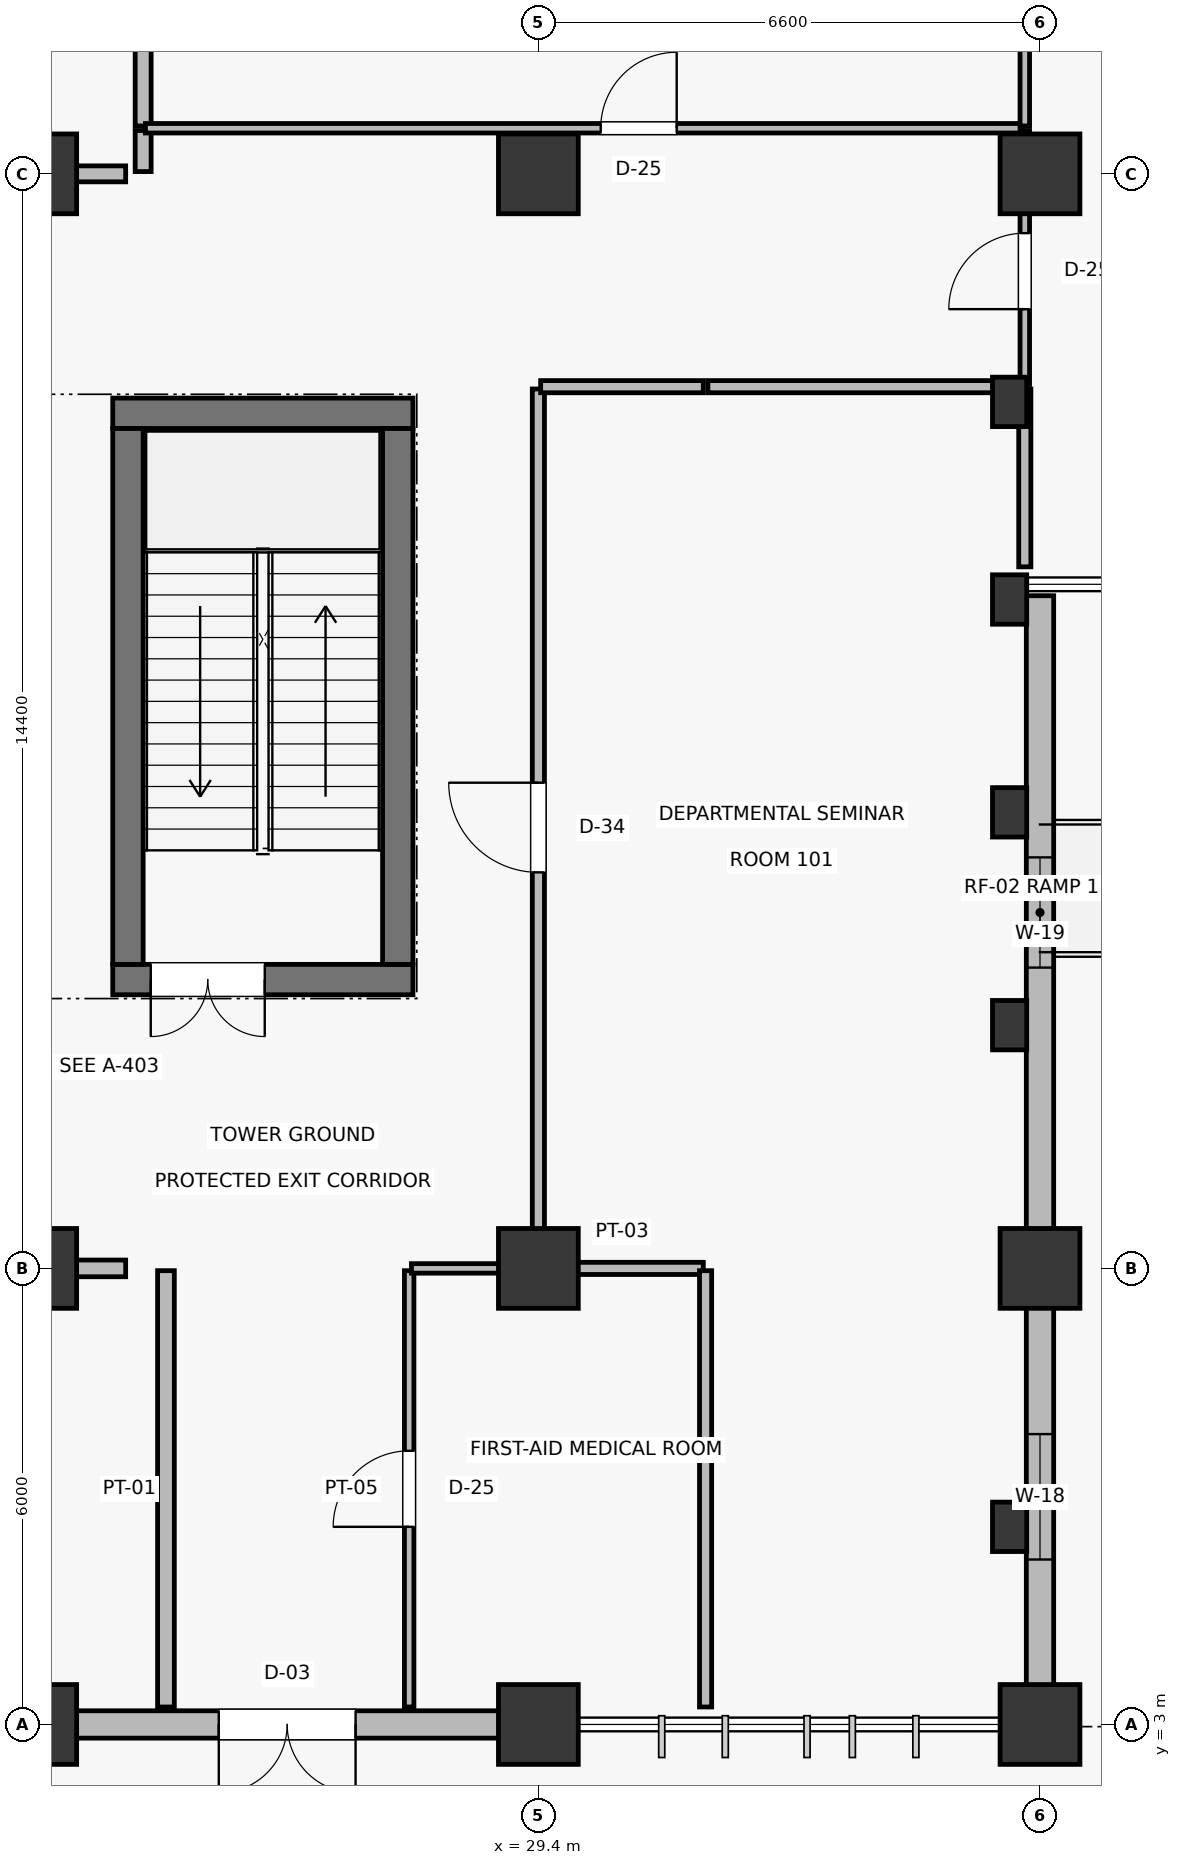
"""IFC4 building model, lengths in metres.
Left out: names, types, materials, properties, quantities, classifications, styles, units other than length and angle.
Written with IfcOpenShell. Run it as: python <this file> out.ifc"""

import sys

from ifc_helpers import new_model, si_unit, direction, frame, frame_2d, origin, origin_2d, place, context, subcontext, project, spatial, rectangle, extrude, element, fill, save


model = new_model("IFC4")
c1 = context("Model", 3, precision=1e-05, world=origin(), true_north=direction((0.0, 1.0)))
c2 = subcontext(c1, "Body", "Model", "MODEL_VIEW")
j1 = project(units=[si_unit("LENGTHUNIT", "METRE"), si_unit("PLANEANGLEUNIT", "RADIAN")], contexts=[c1])
p1 = place(None, origin())
s1 = spatial("IfcSite", under=j1, at=p1, CompositionType="ELEMENT")
p2 = place(p1, origin())
s2 = spatial("IfcBuilding", under=s1, at=p2, CompositionType="ELEMENT")
p3 = place(p2, origin())
s3 = spatial("IfcBuildingStorey", under=s2, at=p3, CompositionType="ELEMENT", Elevation=0.0)
for number, where, z_axis, x_axis in (
    (1, (22.8, 3.0, 0.0), (0.0, 0.0, 1.0), (1.0, 0.0, 0.0)),
    (2, (22.8, 9.0, 0.0), (0.0, 0.0, 1.0), (1.0, 0.0, 0.0)),
    (3, (22.8, 23.4, 0.0), (0.0, 0.0, 1.0), (1.0, 0.0, 0.0)),
    (4, (29.4, 3.0, 0.0), (0.0, 0.0, 1.0), (1.0, 0.0, 0.0)),
    (5, (29.4, 9.0, 0.0), (0.0, 0.0, 1.0), (1.0, 0.0, 0.0)),
    (6, (29.4, 23.4, 0.0), (0.0, 0.0, 1.0), (1.0, 0.0, 0.0)),
    (7, (36.0, 3.0, 0.0), (0.0, 0.0, 1.0), (1.0, 0.0, 0.0)),
    (8, (36.0, 9.0, 0.0), (0.0, 0.0, 1.0), (1.0, 0.0, 0.0)),
    (9, (36.0, 23.4, 0.0), (0.0, 0.0, 1.0), (1.0, 0.0, 0.0)),
):
    element("IfcColumn", number, at=place(p3, frame(where, z_axis=z_axis, x_axis=x_axis)), inside=s3, PredefinedType="COLUMN", context=c2, shape_type="SweptSolid", body=[
        extrude(rectangle(XDim=1.05, YDim=1.05, at=origin_2d()), origin(), (0.0, 0.0, 1.0), 5.4),
    ])
for number, where, z_axis, x_axis in (
    (10, (35.6, 5.6, 0.0), (0.0, 0.0, 1.0), (1.0, 0.0, 0.0)),
    (11, (35.6, 12.2, 0.0), (0.0, 0.0, 1.0), (1.0, 0.0, 0.0)),
    (12, (35.6, 15.0, 0.0), (0.0, 0.0, 1.0), (1.0, 0.0, 0.0)),
    (13, (35.6, 17.8, 0.0), (0.0, 0.0, 1.0), (1.0, 0.0, 0.0)),
    (14, (35.6, 20.4, 0.0), (0.0, 0.0, 1.0), (1.0, 0.0, 0.0)),
):
    element("IfcColumn", number, at=place(p3, frame(where, z_axis=z_axis, x_axis=x_axis)), inside=s3, PredefinedType="PILASTER", context=c2, shape_type="SweptSolid", body=[
        extrude(rectangle(XDim=0.45, YDim=0.65, at=origin_2d()), origin(), (0.0, 0.0, 1.0), 5.4),
    ])
p4 = place(p3, frame((23.305, 3.0, 0.0), z_axis=(0.0, 0.0, 1.0), x_axis=(1.0, 0.0, 0.0)))
e15 = element("IfcWall", 15, at=p4, inside=s3, PredefinedType="SOLIDWALL", context=c2, shape_type="SweptSolid", body=[
    extrude(rectangle(XDim=5.58, YDim=0.36, at=frame_2d((2.79, 0.0))), origin(), (0.0, 0.0, 1.0), 4.475),
])
p5 = place(p4, frame((1.89, 0.0, 0.0)))
e16 = element("IfcOpeningElement", 16, at=p5, cuts=e15, PredefinedType="OPENING", context=c2, shape_type="SweptSolid", body=[
    extrude(rectangle(XDim=1.8, YDim=2.3, at=frame_2d((0.9, 1.15))), frame((0.0, 0.19, 0.0), z_axis=(0.0, -1.0, 0.0), x_axis=(1.0, 0.0, 0.0)), (0.0, 0.0, 1.0), 0.38),
])
p6 = place(p3, frame((36.0, 3.505, 0.0), z_axis=(0.0, 0.0, 1.0), x_axis=(0.0, 1.0, 0.0)))
e17 = element("IfcWall", 17, at=p6, inside=s3, PredefinedType="SOLIDWALL", context=c2, shape_type="SweptSolid", body=[
    extrude(rectangle(XDim=4.98, YDim=0.36, at=frame_2d((2.49, 0.0))), origin(), (0.0, 0.0, 1.0), 4.525),
])
p7 = place(p6, frame((1.665, 0.0, 0.9)))
e18 = element("IfcOpeningElement", 18, at=p7, cuts=e17, PredefinedType="OPENING", context=c2, shape_type="SweptSolid", body=[
    extrude(rectangle(XDim=1.65, YDim=1.65, at=frame_2d((0.825, 0.825))), frame((0.0, 0.19, 0.0), z_axis=(0.0, -1.0, 0.0), x_axis=(1.0, 0.0, 0.0)), (0.0, 0.0, 1.0), 0.38),
])
p8 = place(p3, frame((36.0, 9.515, 0.0), z_axis=(0.0, 0.0, 1.0), x_axis=(0.0, 1.0, 0.0)))
e19 = element("IfcWall", 19, at=p8, inside=s3, PredefinedType="SOLIDWALL", context=c2, shape_type="SweptSolid", body=[
    extrude(rectangle(XDim=8.335, YDim=0.36, at=frame_2d((4.167, 0.0))), origin(), (0.0, 0.0, 1.0), 4.325),
])
p9 = place(p8, frame((3.442, 0.0, 0.9)))
e20 = element("IfcOpeningElement", 20, at=p9, cuts=e19, PredefinedType="OPENING", context=c2, shape_type="SweptSolid", body=[
    extrude(rectangle(XDim=1.45, YDim=1.5, at=frame_2d((0.725, 0.75))), frame((0.0, 0.19, 0.0), z_axis=(0.0, -1.0, 0.0), x_axis=(1.0, 0.0, 0.0)), (0.0, 0.0, 1.0), 0.38),
])
p10 = place(p3, frame((23.8, 12.8, 0.0), z_axis=(0.0, 0.0, 1.0), x_axis=(1.0, 0.0, 0.0)))
e21 = element("IfcWall", 21, at=p10, inside=s3, PredefinedType="SHEAR", context=c2, shape_type="SweptSolid", body=[
    extrude(rectangle(XDim=3.95, YDim=0.4, at=frame_2d((1.975, 0.0))), origin(), (0.0, 0.0, 1.0), 5.18),
])
p11 = place(p10, frame((0.5, 0.0, 0.0)))
e22 = element("IfcOpeningElement", 22, at=p11, cuts=e21, PredefinedType="OPENING", context=c2, shape_type="SweptSolid", body=[
    extrude(rectangle(XDim=1.5, YDim=2.2, at=frame_2d((0.75, 1.1))), frame((0.0, 0.21, 0.0), z_axis=(0.0, -1.0, 0.0), x_axis=(1.0, 0.0, 0.0)), (0.0, 0.0, 1.0), 0.42),
])
p12 = place(p3, frame((23.8, 20.25, 0.0), z_axis=(0.0, 0.0, 1.0), x_axis=(1.0, 0.0, 0.0)))
e23 = element("IfcWall", 23, at=p12, inside=s3, PredefinedType="SHEAR", context=c2, shape_type="SweptSolid", body=[
    extrude(rectangle(XDim=3.95, YDim=0.4, at=frame_2d((1.975, 0.0))), origin(), (0.0, 0.0, 1.0), 5.18),
])
for number, where, z_axis, x_axis in (
    (24, (24.0, 13.0, 0.0), (0.0, 0.0, 1.0), (0.0, 1.0, 0.0)),
    (25, (27.55, 13.0, 0.0), (0.0, 0.0, 1.0), (0.0, 1.0, 0.0)),
):
    element("IfcWall", number, at=place(p3, frame(where, z_axis=z_axis, x_axis=x_axis)), inside=s3, PredefinedType="SHEAR", context=c2, shape_type="SweptSolid", body=[
        extrude(rectangle(XDim=7.05, YDim=0.4, at=frame_2d((3.525, 0.0))), origin(), (0.0, 0.0, 1.0), 5.18),
    ])
p13 = place(p3, frame((24.5, 3.23, 0.0), z_axis=(0.0, 0.0, 1.0), x_axis=(0.0, 1.0, 0.0)))
e26 = element("IfcWall", 26, at=p13, inside=s3, PredefinedType="PARTITIONING", context=c2, shape_type="SweptSolid", body=[
    extrude(rectangle(XDim=5.74, YDim=0.22, at=frame_2d((2.87, 0.0))), origin(), (0.0, 0.0, 1.0), 4.425),
])
p14 = place(p3, frame((14.53, 9.0, 0.0), z_axis=(0.0, 0.0, 1.0), x_axis=(1.0, 0.0, 0.0)))
e27 = element("IfcWall", 27, at=p14, inside=s3, PredefinedType="PARTITIONING", context=c2, shape_type="SweptSolid", body=[
    extrude(rectangle(XDim=9.44, YDim=0.22, at=frame_2d((4.72, 0.0))), origin(), (0.0, 0.0, 1.0), 4.255),
])
p15 = place(p14, frame((4.245, 0.0, 0.0)))
e28 = element("IfcOpeningElement", 28, at=p15, cuts=e27, PredefinedType="OPENING", context=c2, shape_type="SweptSolid", body=[
    extrude(rectangle(XDim=0.95, YDim=2.15, at=frame_2d((0.475, 1.075))), frame((0.0, 0.12, 0.0), z_axis=(0.0, -1.0, 0.0), x_axis=(1.0, 0.0, 0.0)), (0.0, 0.0, 1.0), 0.24),
])
p16 = place(p3, frame((29.43, 9.0, 0.0), z_axis=(0.0, 0.0, 1.0), x_axis=(1.0, 0.0, 0.0)))
e29 = element("IfcWall", 29, at=p16, inside=s3, PredefinedType="PARTITIONING", context=c2, shape_type="SweptSolid", body=[
    extrude(rectangle(XDim=2.14, YDim=0.16, at=frame_2d((1.07, 0.0))), origin(), (0.0, 0.0, 1.0), 4.215),
])
p17 = place(p3, frame((31.6, 3.23, 0.0), z_axis=(0.0, 0.0, 1.0), x_axis=(0.0, 1.0, 0.0)))
e30 = element("IfcWall", 30, at=p17, inside=s3, PredefinedType="PARTITIONING", context=c2, shape_type="SweptSolid", body=[
    extrude(rectangle(XDim=5.74, YDim=0.16, at=frame_2d((2.87, 0.0))), origin(), (0.0, 0.0, 1.0), 4.215),
])
p18 = place(p3, frame((27.7, 3.23, 0.0), z_axis=(0.0, 0.0, 1.0), x_axis=(0.0, 1.0, 0.0)))
e31 = element("IfcWall", 31, at=p18, inside=s3, PredefinedType="PARTITIONING", context=c2, shape_type="SweptSolid", body=[
    extrude(rectangle(XDim=5.74, YDim=0.125, at=frame_2d((2.87, 0.0))), origin(), (0.0, 0.0, 1.0), 4.425),
])
p19 = place(p18, frame((2.37, 0.0, 0.0)))
e32 = element("IfcOpeningElement", 32, at=p19, cuts=e31, PredefinedType="OPENING", context=c2, shape_type="SweptSolid", body=[
    extrude(rectangle(XDim=1.0, YDim=2.15, at=frame_2d((0.5, 1.075))), frame((0.0, 0.073, 0.0), z_axis=(0.0, -1.0, 0.0), x_axis=(1.0, 0.0, 0.0)), (0.0, 0.0, 1.0), 0.145),
])
p20 = place(p3, frame((27.73, 9.0, 0.0), z_axis=(0.0, 0.0, 1.0), x_axis=(1.0, 0.0, 0.0)))
e33 = element("IfcWall", 33, at=p20, inside=s3, PredefinedType="PARTITIONING", context=c2, shape_type="SweptSolid", body=[
    extrude(rectangle(XDim=1.64, YDim=0.125, at=frame_2d((0.82, 0.0))), origin(), (0.0, 0.0, 1.0), 4.425),
])
p21 = place(p3, frame((29.4, 9.03, 0.0), z_axis=(0.0, 0.0, 1.0), x_axis=(0.0, 1.0, 0.0)))
e34 = element("IfcWall", 34, at=p21, inside=s3, PredefinedType="PARTITIONING", context=c2, shape_type="SweptSolid", body=[
    extrude(rectangle(XDim=11.54, YDim=0.16, at=frame_2d((5.77, 0.0))), origin(), (0.0, 0.0, 1.0), 4.325),
])
p22 = place(p21, frame((5.18, 0.0, 0.0)))
e35 = element("IfcOpeningElement", 35, at=p22, cuts=e34, PredefinedType="OPENING", context=c2, shape_type="SweptSolid", body=[
    extrude(rectangle(XDim=1.18, YDim=2.2, at=frame_2d((0.59, 1.1))), frame((0.0, 0.09, 0.0), z_axis=(0.0, -1.0, 0.0), x_axis=(1.0, 0.0, 0.0)), (0.0, 0.0, 1.0), 0.18),
])
p23 = place(p3, frame((29.43, 20.6, 0.0), z_axis=(0.0, 0.0, 1.0), x_axis=(1.0, 0.0, 0.0)))
e36 = element("IfcWall", 36, at=p23, inside=s3, PredefinedType="PARTITIONING", context=c2, shape_type="SweptSolid", body=[
    extrude(rectangle(XDim=2.14, YDim=0.16, at=frame_2d((1.07, 0.0))), origin(), (0.0, 0.0, 1.0), 4.325),
])
p24 = place(p3, frame((31.63, 20.6, 0.0), z_axis=(0.0, 0.0, 1.0), x_axis=(1.0, 0.0, 0.0)))
e37 = element("IfcWall", 37, at=p24, inside=s3, PredefinedType="PARTITIONING", context=c2, shape_type="SweptSolid", body=[
    extrude(rectangle(XDim=4.14, YDim=0.16, at=frame_2d((2.07, 0.0))), origin(), (0.0, 0.0, 1.0), 4.325),
])
p25 = place(p3, frame((35.8, 18.23, 0.0), z_axis=(0.0, 0.0, 1.0), x_axis=(0.0, 1.0, 0.0)))
e38 = element("IfcWall", 38, at=p25, inside=s3, PredefinedType="PARTITIONING", context=c2, shape_type="SweptSolid", body=[
    extrude(rectangle(XDim=2.34, YDim=0.16, at=frame_2d((1.17, 0.0))), origin(), (0.0, 0.0, 1.0), 4.325),
])
p26 = place(p3, frame((24.2, 24.03, 0.0), z_axis=(0.0, 0.0, 1.0), x_axis=(0.0, 1.0, 0.0)))
e39 = element("IfcWall", 39, at=p26, inside=s3, PredefinedType="PLUMBINGWALL", context=c2, shape_type="SweptSolid", body=[
    extrude(rectangle(XDim=5.74, YDim=0.21, at=frame_2d((2.87, 0.0))), origin(), (0.0, 0.0, 1.0), 4.255),
])
p27 = place(p3, frame((24.2, 23.43, 0.0), z_axis=(0.0, 0.0, 1.0), x_axis=(0.0, 1.0, 0.0)))
e40 = element("IfcWall", 40, at=p27, inside=s3, PredefinedType="PLUMBINGWALL", context=c2, shape_type="SweptSolid", body=[
    extrude(rectangle(XDim=0.54, YDim=0.21, at=frame_2d((0.27, 0.0))), origin(), (0.0, 0.0, 1.0), 4.425),
])
p28 = place(p3, frame((17.83, 23.4, 0.0), z_axis=(0.0, 0.0, 1.0), x_axis=(1.0, 0.0, 0.0)))
e41 = element("IfcWall", 41, at=p28, inside=s3, PredefinedType="PLUMBINGWALL", context=c2, shape_type="SweptSolid", body=[
    extrude(rectangle(XDim=6.14, YDim=0.21, at=frame_2d((3.07, 0.0))), origin(), (0.0, 0.0, 1.0), 4.425),
])
p29 = place(p3, frame((24.23, 24.0, 0.0), z_axis=(0.0, 0.0, 1.0), x_axis=(1.0, 0.0, 0.0)))
e42 = element("IfcWall", 42, at=p29, inside=s3, PredefinedType="PARTITIONING", context=c2, shape_type="SweptSolid", body=[
    extrude(rectangle(XDim=11.54, YDim=0.125, at=frame_2d((5.77, 0.0))), origin(), (0.0, 0.0, 1.0), 4.505),
])
p30 = place(p29, frame((5.99, 0.0, 0.0)))
e43 = element("IfcOpeningElement", 43, at=p30, cuts=e42, PredefinedType="OPENING", context=c2, shape_type="SweptSolid", body=[
    extrude(rectangle(XDim=1.0, YDim=2.15, at=frame_2d((0.5, 1.075))), frame((0.0, 0.073, 0.0), z_axis=(0.0, -1.0, 0.0), x_axis=(1.0, 0.0, 0.0)), (0.0, 0.0, 1.0), 0.145),
])
p31 = place(p3, frame((35.8, 24.03, 0.0), z_axis=(0.0, 0.0, 1.0), x_axis=(0.0, 1.0, 0.0)))
e44 = element("IfcWall", 44, at=p31, inside=s3, PredefinedType="PARTITIONING", context=c2, shape_type="SweptSolid", body=[
    extrude(rectangle(XDim=1.94, YDim=0.125, at=frame_2d((0.97, 0.0))), origin(), (0.0, 0.0, 1.0), 4.505),
])
p32 = place(p3, frame((35.8, 20.63, 0.0), z_axis=(0.0, 0.0, 1.0), x_axis=(0.0, 1.0, 0.0)))
e45 = element("IfcWall", 45, at=p32, inside=s3, PredefinedType="PARTITIONING", context=c2, shape_type="SweptSolid", body=[
    extrude(rectangle(XDim=3.34, YDim=0.125, at=frame_2d((1.67, 0.0))), origin(), (0.0, 0.0, 1.0), 4.325),
])
p33 = place(p32, frame((0.99, 0.0, 0.0)))
e46 = element("IfcOpeningElement", 46, at=p33, cuts=e45, PredefinedType="OPENING", context=c2, shape_type="SweptSolid", body=[
    extrude(rectangle(XDim=1.0, YDim=2.15, at=frame_2d((0.5, 1.075))), frame((0.0, 0.073, 0.0), z_axis=(0.0, -1.0, 0.0), x_axis=(1.0, 0.0, 0.0)), (0.0, 0.0, 1.0), 0.145),
])
p34 = place(p5, frame((1.8, 0.0, 0.0), z_axis=(0.0, 0.0, 1.0), x_axis=(-1.0, 0.0, 0.0)))
e47 = element("IfcDoor", 47, at=p34, inside=s3, OperationType="DOUBLE_DOOR_SINGLE_SWING", PredefinedType="DOOR", context=c2, shape_type="SweptSolid", body=[
    extrude(rectangle(XDim=1.8, YDim=2.3, at=frame_2d((0.9, 1.15))), frame((0.0, 0.025, 0.0), z_axis=(0.0, -1.0, 0.0), x_axis=(1.0, 0.0, 0.0)), (0.0, 0.0, 1.0), 0.05),
])
fill(e16, e47)
p35 = place(p7, frame((1.65, 0.0, 0.0), z_axis=(0.0, 0.0, 1.0), x_axis=(-1.0, 0.0, 0.0)))
e48 = element("IfcWindow", 48, at=p35, inside=s3, PartitioningType="SINGLE_PANEL", PredefinedType="WINDOW", context=c2, shape_type="SweptSolid", body=[
    extrude(rectangle(XDim=1.65, YDim=1.65, at=frame_2d((0.825, 0.825))), frame((0.0, 0.03, 0.0), z_axis=(0.0, -1.0, 0.0), x_axis=(1.0, 0.0, 0.0)), (0.0, 0.0, 1.0), 0.06),
])
fill(e18, e48)
p36 = place(p9, frame((1.45, 0.0, 0.0), z_axis=(0.0, 0.0, 1.0), x_axis=(-1.0, 0.0, 0.0)))
e49 = element("IfcWindow", 49, at=p36, inside=s3, PartitioningType="SINGLE_PANEL", PredefinedType="WINDOW", context=c2, shape_type="SweptSolid", body=[
    extrude(rectangle(XDim=1.45, YDim=1.5, at=frame_2d((0.725, 0.75))), frame((0.0, 0.03, 0.0), z_axis=(0.0, -1.0, 0.0), x_axis=(1.0, 0.0, 0.0)), (0.0, 0.0, 1.0), 0.06),
])
fill(e20, e49)
p37 = place(p11, frame((1.5, 0.0, 0.0), z_axis=(0.0, 0.0, 1.0), x_axis=(-1.0, 0.0, 0.0)))
e50 = element("IfcDoor", 50, at=p37, inside=s3, OperationType="DOUBLE_DOOR_SINGLE_SWING", PredefinedType="DOOR", context=c2, shape_type="SweptSolid", body=[
    extrude(rectangle(XDim=1.5, YDim=2.2, at=frame_2d((0.75, 1.1))), frame((0.0, 0.025, 0.0), z_axis=(0.0, -1.0, 0.0), x_axis=(1.0, 0.0, 0.0)), (0.0, 0.0, 1.0), 0.05),
])
fill(e22, e50)
p38 = place(p19, origin())
e51 = element("IfcDoor", 51, at=p38, inside=s3, OperationType="SINGLE_SWING_LEFT", PredefinedType="DOOR", context=c2, shape_type="SweptSolid", body=[
    extrude(rectangle(XDim=1.0, YDim=2.15, at=frame_2d((0.5, 1.075))), frame((0.0, 0.025, 0.0), z_axis=(0.0, -1.0, 0.0), x_axis=(1.0, 0.0, 0.0)), (0.0, 0.0, 1.0), 0.05),
])
fill(e32, e51)
p39 = place(p22, origin())
e52 = element("IfcDoor", 52, at=p39, inside=s3, OperationType="SINGLE_SWING_RIGHT", PredefinedType="DOOR", context=c2, shape_type="SweptSolid", body=[
    extrude(rectangle(XDim=1.18, YDim=2.2, at=frame_2d((0.59, 1.1))), frame((0.0, 0.025, 0.0), z_axis=(0.0, -1.0, 0.0), x_axis=(1.0, 0.0, 0.0)), (0.0, 0.0, 1.0), 0.05),
])
fill(e35, e52)
p40 = place(p30, origin())
e53 = element("IfcDoor", 53, at=p40, inside=s3, OperationType="SINGLE_SWING_RIGHT", PredefinedType="DOOR", context=c2, shape_type="SweptSolid", body=[
    extrude(rectangle(XDim=1.0, YDim=2.15, at=frame_2d((0.5, 1.075))), frame((0.0, 0.025, 0.0), z_axis=(0.0, -1.0, 0.0), x_axis=(1.0, 0.0, 0.0)), (0.0, 0.0, 1.0), 0.05),
])
fill(e43, e53)
p41 = place(p33, origin())
e54 = element("IfcDoor", 54, at=p41, inside=s3, OperationType="SINGLE_SWING_LEFT", PredefinedType="DOOR", context=c2, shape_type="SweptSolid", body=[
    extrude(rectangle(XDim=1.0, YDim=2.15, at=frame_2d((0.5, 1.075))), frame((0.0, 0.025, 0.0), z_axis=(0.0, -1.0, 0.0), x_axis=(1.0, 0.0, 0.0)), (0.0, 0.0, 1.0), 0.05),
])
fill(e46, e54)
save(model, sys.argv[1])
